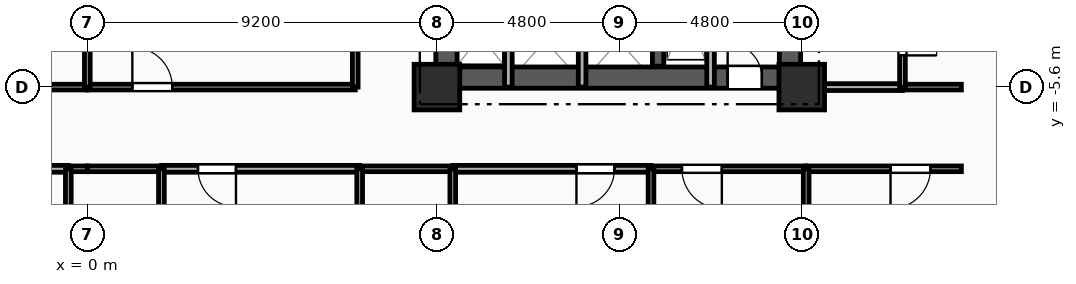
"""IFC4 building model, lengths in metres.
Left out: names, types, materials, properties, quantities, classifications, styles, units other than length and angle.
Written with IfcOpenShell. Run it as: python <this file> out.ifc"""

import sys

from ifc_helpers import new_model, si_unit, direction, frame, frame_2d, origin, origin_2d, place, context, subcontext, project, spatial, rectangle, extrude, element, fill, save


model = new_model("IFC4")
c1 = context("Model", 3, precision=1e-05, world=origin(), true_north=direction((0.0, 1.0)))
c2 = subcontext(c1, "Body", "Model", "MODEL_VIEW")
j1 = project(units=[si_unit("LENGTHUNIT", "METRE"), si_unit("PLANEANGLEUNIT", "RADIAN")], contexts=[c1])
p1 = place(None, origin())
s1 = spatial("IfcSite", under=j1, at=p1, CompositionType="ELEMENT")
p2 = place(p1, origin())
s2 = spatial("IfcBuilding", under=s1, at=p2, CompositionType="ELEMENT")
p3 = place(p2, frame((0.0, 0.0, 30.35)))
s3 = spatial("IfcBuildingStorey", under=s2, at=p3, CompositionType="ELEMENT", Elevation=30.35)
for number, where, z_axis, x_axis in (
    (1, (9.2, -5.6, 0.0), (0.0, 0.0, 1.0), (1.0, 0.0, 0.0)),
    (2, (18.8, -5.6, 0.0), (0.0, 0.0, 1.0), (1.0, 0.0, 0.0)),
):
    element("IfcColumn", number, at=place(p3, frame(where, z_axis=z_axis, x_axis=x_axis)), inside=s3, PredefinedType="COLUMN", context=c2, shape_type="SweptSolid", body=[
        extrude(rectangle(XDim=1.2, YDim=1.2, at=origin_2d()), origin(), (0.0, 0.0, 1.0), 3.35),
    ])
p4 = place(p3, frame((9.2, -5.35, 0.0), z_axis=(0.0, 0.0, 1.0), x_axis=(1.0, 0.0, 0.0)))
e3 = element("IfcWall", 3, at=p4, inside=s3, PredefinedType="SHEAR", context=c2, shape_type="SweptSolid", body=[
    extrude(rectangle(XDim=9.6, YDim=0.56, at=frame_2d((4.8, 0.0))), origin(), (0.0, 0.0, 1.0), 3.035),
])
p5 = place(p4, frame((7.65, 0.0, 0.0)))
e4 = element("IfcOpeningElement", 4, at=p5, cuts=e3, PredefinedType="OPENING", context=c2, shape_type="SweptSolid", body=[
    extrude(rectangle(XDim=0.9, YDim=2.1, at=frame_2d((0.45, 1.05))), frame((0.0, 0.29, 0.0), z_axis=(0.0, -1.0, 0.0), x_axis=(1.0, 0.0, 0.0)), (0.0, 0.0, 1.0), 0.58),
])
p6 = place(p3, frame((9.45, -5.05, 0.0), z_axis=(0.0, 0.0, 1.0), x_axis=(0.0, 1.0, 0.0)))
e5 = element("IfcWall", 5, at=p6, inside=s3, PredefinedType="SHEAR", context=c2, shape_type="SweptSolid", body=[
    extrude(rectangle(XDim=10.1, YDim=0.56, at=frame_2d((5.05, 0.0))), origin(), (0.0, 0.0, 1.0), 3.035),
])
p7 = place(p6, frame((7.15, 0.0, 0.0)))
e6 = element("IfcOpeningElement", 6, at=p7, cuts=e5, PredefinedType="OPENING", context=c2, shape_type="SweptSolid", body=[
    extrude(rectangle(XDim=0.9, YDim=2.1, at=frame_2d((0.45, 1.05))), frame((0.0, 0.29, 0.0), z_axis=(0.0, -1.0, 0.0), x_axis=(1.0, 0.0, 0.0)), (0.0, 0.0, 1.0), 0.58),
])
p8 = place(p6, frame((2.4, 0.0, 0.0)))
e7 = element("IfcOpeningElement", 7, at=p8, cuts=e5, PredefinedType="OPENING", context=c2, shape_type="SweptSolid", body=[
    extrude(rectangle(XDim=1.2, YDim=2.15, at=frame_2d((0.6, 1.075))), frame((0.0, 0.29, 0.0), z_axis=(0.0, -1.0, 0.0), x_axis=(1.0, 0.0, 0.0)), (0.0, 0.0, 1.0), 0.58),
])
p9 = place(p3, frame((18.49, -5.05, 0.0), z_axis=(0.0, 0.0, 1.0), x_axis=(0.0, 1.0, 0.0)))
e8 = element("IfcWall", 8, at=p9, inside=s3, PredefinedType="SHEAR", context=c2, shape_type="SweptSolid", body=[
    extrude(rectangle(XDim=10.1, YDim=0.56, at=frame_2d((5.05, 0.0))), origin(), (0.0, 0.0, 1.0), 3.035),
])
p10 = place(p3, frame((15.02, -5.05, 0.0), z_axis=(0.0, 0.0, 1.0), x_axis=(0.0, 1.0, 0.0)))
e9 = element("IfcWall", 9, at=p10, inside=s3, PredefinedType="SHEAR", context=c2, shape_type="SweptSolid", body=[
    extrude(rectangle(XDim=10.1, YDim=0.3, at=frame_2d((5.05, 0.0))), origin(), (0.0, 0.0, 1.0), 3.035),
])
p11 = place(p3, frame((16.4, -2.11, 0.0), z_axis=(0.0, 0.0, 1.0), x_axis=(0.0, -1.0, 0.0)))
e10 = element("IfcWall", 10, at=p11, inside=s3, PredefinedType="PARTITIONING", context=c2, shape_type="SweptSolid", body=[
    extrude(rectangle(XDim=3.49, YDim=0.2, at=frame_2d((1.745, 0.0))), origin(), (0.0, 0.0, 1.0), 3.035),
])
for number, where, z_axis, x_axis in (
    (11, (11.08, -5.6, 0.0), (0.0, 0.0, 1.0), (0.0, 1.0, 0.0)),
    (12, (13.02, -5.6, 0.0), (0.0, 0.0, 1.0), (0.0, 1.0, 0.0)),
):
    element("IfcWall", number, at=place(p3, frame(where, z_axis=z_axis, x_axis=x_axis)), inside=s3, PredefinedType="PARTITIONING", context=c2, shape_type="SweptSolid", body=[
        extrude(rectangle(XDim=2.25, YDim=0.2, at=frame_2d((1.125, 0.0))), origin(), (0.0, 0.0, 1.0), 3.035),
    ])
p12 = place(p3, frame((-0.5, -7.75, 0.0), z_axis=(0.0, 0.0, 1.0), x_axis=(-1.0, 0.0, 0.0)))
e13 = element("IfcWall", 13, at=p12, inside=s3, PredefinedType="PARTITIONING", context=c2, shape_type="SweptSolid", body=[
    extrude(rectangle(XDim=5.217, YDim=0.18, at=frame_2d((2.608, 0.0))), origin(), (0.0, 0.0, 1.0), 3.035),
])
p13 = place(p12, frame((0.962, 0.0, 0.0)))
e14 = element("IfcOpeningElement", 14, at=p13, cuts=e13, PredefinedType="OPENING", context=c2, shape_type="SweptSolid", body=[
    extrude(rectangle(XDim=1.0, YDim=2.15, at=frame_2d((0.5, 1.075))), frame((0.0, 0.1, 0.0), z_axis=(0.0, -1.0, 0.0), x_axis=(1.0, 0.0, 0.0)), (0.0, 0.0, 1.0), 0.2),
])
p14 = place(p3, frame((0.0, -7.75, 0.0), z_axis=(0.0, 0.0, 1.0), x_axis=(-1.0, 0.0, 0.0)))
e15 = element("IfcWall", 15, at=p14, inside=s3, PredefinedType="PLUMBINGWALL", context=c2, shape_type="SweptSolid", body=[
    extrude(rectangle(XDim=0.5, YDim=0.15, at=frame_2d((0.25, 0.0))), origin(), (0.0, 0.0, 1.0), 3.035),
])
p15 = place(p3, frame((-7.05, -5.6, 0.0), z_axis=(0.0, 0.0, 1.0), x_axis=(1.0, 0.0, 0.0)))
e16 = element("IfcWall", 16, at=p15, inside=s3, PredefinedType="PARTITIONING", context=c2, shape_type="SweptSolid", body=[
    extrude(rectangle(XDim=7.05, YDim=0.15, at=frame_2d((3.525, 0.0))), origin(), (0.0, 0.0, 1.0), 2.52),
])
p16 = place(p3, frame((18.8, -5.6, 0.0), z_axis=(0.0, 0.0, 1.0), x_axis=(1.0, 0.0, 0.0)))
e17 = element("IfcWall", 17, at=p16, inside=s3, PredefinedType="PARTITIONING", context=c2, shape_type="SweptSolid", body=[
    extrude(rectangle(XDim=2.65, YDim=0.18, at=frame_2d((1.325, 0.0))), origin(), (0.0, 0.0, 1.0), 3.035),
])
p17 = place(p3, frame((21.45, -5.6, 0.0), z_axis=(0.0, 0.0, 1.0), x_axis=(1.0, 0.0, 0.0)))
e18 = element("IfcWall", 18, at=p17, inside=s3, PredefinedType="PLUMBINGWALL", context=c2, shape_type="SweptSolid", body=[
    extrude(rectangle(XDim=1.55, YDim=0.15, at=frame_2d((0.775, 0.0))), origin(), (0.0, 0.0, 1.0), 3.035),
])
p18 = place(p3, frame((7.167, -7.75, 0.0), z_axis=(0.0, 0.0, 1.0), x_axis=(-1.0, 0.0, 0.0)))
e19 = element("IfcWall", 19, at=p18, inside=s3, PredefinedType="PARTITIONING", context=c2, shape_type="SweptSolid", body=[
    extrude(rectangle(XDim=5.217, YDim=0.18, at=frame_2d((2.608, 0.0))), origin(), (0.0, 0.0, 1.0), 3.035),
])
p19 = place(p18, frame((3.255, 0.0, 0.0)))
e20 = element("IfcOpeningElement", 20, at=p19, cuts=e19, PredefinedType="OPENING", context=c2, shape_type="SweptSolid", body=[
    extrude(rectangle(XDim=1.0, YDim=2.15, at=frame_2d((0.5, 1.075))), frame((0.0, 0.1, 0.0), z_axis=(0.0, -1.0, 0.0), x_axis=(1.0, 0.0, 0.0)), (0.0, 0.0, 1.0), 0.2),
])
p20 = place(p3, frame((1.95, -7.75, 0.0), z_axis=(0.0, 0.0, 1.0), x_axis=(-1.0, 0.0, 0.0)))
e21 = element("IfcWall", 21, at=p20, inside=s3, PredefinedType="PLUMBINGWALL", context=c2, shape_type="SweptSolid", body=[
    extrude(rectangle(XDim=1.95, YDim=0.15, at=frame_2d((0.975, 0.0))), origin(), (0.0, 0.0, 1.0), 3.035),
])
p21 = place(p3, frame((14.833, -7.75, 0.0), z_axis=(0.0, 0.0, 1.0), x_axis=(-1.0, 0.0, 0.0)))
e22 = element("IfcWall", 22, at=p21, inside=s3, PredefinedType="PARTITIONING", context=c2, shape_type="SweptSolid", body=[
    extrude(rectangle(XDim=5.216, YDim=0.18, at=frame_2d((2.608, 0.0))), origin(), (0.0, 0.0, 1.0), 3.035),
])
p22 = place(p21, frame((0.962, 0.0, 0.0)))
e23 = element("IfcOpeningElement", 23, at=p22, cuts=e22, PredefinedType="OPENING", context=c2, shape_type="SweptSolid", body=[
    extrude(rectangle(XDim=1.0, YDim=2.15, at=frame_2d((0.5, 1.075))), frame((0.0, 0.1, 0.0), z_axis=(0.0, -1.0, 0.0), x_axis=(1.0, 0.0, 0.0)), (0.0, 0.0, 1.0), 0.2),
])
p23 = place(p3, frame((9.617, -7.75, 0.0), z_axis=(0.0, 0.0, 1.0), x_axis=(-1.0, 0.0, 0.0)))
e24 = element("IfcWall", 24, at=p23, inside=s3, PredefinedType="PLUMBINGWALL", context=c2, shape_type="SweptSolid", body=[
    extrude(rectangle(XDim=2.45, YDim=0.15, at=frame_2d((1.225, 0.0))), origin(), (0.0, 0.0, 1.0), 3.035),
])
p24 = place(p3, frame((18.917, -7.75, 0.0), z_axis=(0.0, 0.0, 1.0), x_axis=(-1.0, 0.0, 0.0)))
e25 = element("IfcWall", 25, at=p24, inside=s3, PredefinedType="PARTITIONING", context=c2, shape_type="SweptSolid", body=[
    extrude(rectangle(XDim=4.083, YDim=0.15, at=frame_2d((2.042, 0.0))), origin(), (0.0, 0.0, 1.0), 3.035),
])
p25 = place(p24, frame((2.219, 0.0, 0.0)))
e26 = element("IfcOpeningElement", 26, at=p25, cuts=e25, PredefinedType="OPENING", context=c2, shape_type="SweptSolid", body=[
    extrude(rectangle(XDim=1.05, YDim=2.15, at=frame_2d((0.525, 1.075))), frame((0.0, 0.085, 0.0), z_axis=(0.0, -1.0, 0.0), x_axis=(1.0, 0.0, 0.0)), (0.0, 0.0, 1.0), 0.17),
])
p26 = place(p3, frame((23.0, -7.75, 0.0), z_axis=(0.0, 0.0, 1.0), x_axis=(-1.0, 0.0, 0.0)))
e27 = element("IfcWall", 27, at=p26, inside=s3, PredefinedType="PARTITIONING", context=c2, shape_type="SweptSolid", body=[
    extrude(rectangle(XDim=4.083, YDim=0.15, at=frame_2d((2.042, 0.0))), origin(), (0.0, 0.0, 1.0), 3.035),
])
p27 = place(p26, frame((0.814, 0.0, 0.0)))
e28 = element("IfcOpeningElement", 28, at=p27, cuts=e27, PredefinedType="OPENING", context=c2, shape_type="SweptSolid", body=[
    extrude(rectangle(XDim=1.05, YDim=2.15, at=frame_2d((0.525, 1.075))), frame((0.0, 0.085, 0.0), z_axis=(0.0, -1.0, 0.0), x_axis=(1.0, 0.0, 0.0)), (0.0, 0.0, 1.0), 0.17),
])
p28 = place(p3, frame((0.0, -5.6, 0.0), z_axis=(0.0, 0.0, 1.0), x_axis=(1.0, 0.0, 0.0)))
e29 = element("IfcWall", 29, at=p28, inside=s3, PredefinedType="PARTITIONING", context=c2, shape_type="SweptSolid", body=[
    extrude(rectangle(XDim=7.05, YDim=0.15, at=frame_2d((3.525, 0.0))), origin(), (0.0, 0.0, 1.0), 2.52),
])
p29 = place(p28, frame((1.185, 0.0, 0.0)))
e30 = element("IfcOpeningElement", 30, at=p29, cuts=e29, PredefinedType="OPENING", context=c2, shape_type="SweptSolid", body=[
    extrude(rectangle(XDim=1.05, YDim=2.15, at=frame_2d((0.525, 1.075))), frame((0.0, 0.085, 0.0), z_axis=(0.0, -1.0, 0.0), x_axis=(1.0, 0.0, 0.0)), (0.0, 0.0, 1.0), 0.17),
])
p30 = place(p3, frame((7.05, -5.6, 0.0), z_axis=(0.0, 0.0, 1.0), x_axis=(0.0, 1.0, 0.0)))
e31 = element("IfcWall", 31, at=p30, inside=s3, PredefinedType="PARTITIONING", context=c2, shape_type="SweptSolid", body=[
    extrude(rectangle(XDim=7.05, YDim=0.15, at=frame_2d((3.525, 0.0))), origin(), (0.0, 0.0, 1.0), 3.035),
])
p31 = place(p3, frame((21.45, -3.25, 0.0), z_axis=(0.0, 0.0, 1.0), x_axis=(0.0, -1.0, 0.0)))
e32 = element("IfcWall", 32, at=p31, inside=s3, PredefinedType="PLUMBINGWALL", context=c2, shape_type="SweptSolid", body=[
    extrude(rectangle(XDim=2.35, YDim=0.15, at=frame_2d((1.175, 0.0))), origin(), (0.0, 0.0, 1.0), 3.035),
])
p32 = place(p31, frame((0.616, 0.0, 0.0)))
e33 = element("IfcOpeningElement", 33, at=p32, cuts=e32, PredefinedType="OPENING", context=c2, shape_type="SweptSolid", body=[
    extrude(rectangle(XDim=0.9, YDim=2.1, at=frame_2d((0.45, 1.05))), frame((0.0, 0.085, 0.0), z_axis=(0.0, -1.0, 0.0), x_axis=(1.0, 0.0, 0.0)), (0.0, 0.0, 1.0), 0.17),
])
for number, where, z_axis, x_axis in (
    (34, (-0.5, -7.75, 0.0), (0.0, 0.0, 1.0), (0.0, -1.0, 0.0)),
    (35, (1.95, -9.9, 0.0), (0.0, 0.0, 1.0), (0.0, 1.0, 0.0)),
    (36, (7.167, -7.75, 0.0), (0.0, 0.0, 1.0), (0.0, -1.0, 0.0)),
    (37, (9.617, -9.9, 0.0), (0.0, 0.0, 1.0), (0.0, 1.0, 0.0)),
):
    element("IfcWall", number, at=place(p3, frame(where, z_axis=z_axis, x_axis=x_axis)), inside=s3, PredefinedType="PLUMBINGWALL", context=c2, shape_type="SweptSolid", body=[
        extrude(rectangle(XDim=2.15, YDim=0.15, at=frame_2d((1.075, 0.0))), origin(), (0.0, 0.0, 1.0), 3.035),
    ])
p33 = place(p3, frame((14.833, -7.75, 0.0), z_axis=(0.0, 0.0, 1.0), x_axis=(0.0, -1.0, 0.0)))
e38 = element("IfcWall", 38, at=p33, inside=s3, PredefinedType="PARTITIONING", context=c2, shape_type="SweptSolid", body=[
    extrude(rectangle(XDim=11.65, YDim=0.15, at=frame_2d((5.825, 0.0))), origin(), (0.0, 0.0, 1.0), 3.035),
])
p34 = place(p3, frame((18.917, -7.75, 0.0), z_axis=(0.0, 0.0, 1.0), x_axis=(0.0, -1.0, 0.0)))
e39 = element("IfcWall", 39, at=p34, inside=s3, PredefinedType="PARTITIONING", context=c2, shape_type="SweptSolid", body=[
    extrude(rectangle(XDim=11.65, YDim=0.15, at=frame_2d((5.825, 0.0))), origin(), (0.0, 0.0, 1.0), 2.52),
])
p35 = place(p3, frame((0.0, 1.45, 0.0), z_axis=(0.0, 0.0, 1.0), x_axis=(0.0, -1.0, 0.0)))
e40 = element("IfcWall", 40, at=p35, inside=s3, PredefinedType="PARTITIONING", context=c2, shape_type="SweptSolid", body=[
    extrude(rectangle(XDim=7.05, YDim=0.15, at=frame_2d((3.525, 0.0))), origin(), (0.0, 0.0, 1.0), 3.035),
])
p36 = place(p5, origin())
e41 = element("IfcDoor", 41, at=p36, inside=s3, OperationType="SINGLE_SWING_LEFT", PredefinedType="DOOR", context=c2, shape_type="SweptSolid", body=[
    extrude(rectangle(XDim=0.9, YDim=2.1, at=frame_2d((0.45, 1.05))), frame((0.0, 0.025, 0.0), z_axis=(0.0, -1.0, 0.0), x_axis=(1.0, 0.0, 0.0)), (0.0, 0.0, 1.0), 0.05),
])
fill(e4, e41)
p37 = place(p19, origin())
e42 = element("IfcDoor", 42, at=p37, inside=s3, OperationType="SINGLE_SWING_LEFT", PredefinedType="DOOR", context=c2, shape_type="SweptSolid", body=[
    extrude(rectangle(XDim=1.0, YDim=2.15, at=frame_2d((0.5, 1.075))), frame((0.0, 0.025, 0.0), z_axis=(0.0, -1.0, 0.0), x_axis=(1.0, 0.0, 0.0)), (0.0, 0.0, 1.0), 0.05),
])
fill(e20, e42)
p38 = place(p22, origin())
e43 = element("IfcDoor", 43, at=p38, inside=s3, OperationType="SINGLE_SWING_RIGHT", PredefinedType="DOOR", context=c2, shape_type="SweptSolid", body=[
    extrude(rectangle(XDim=1.0, YDim=2.15, at=frame_2d((0.5, 1.075))), frame((0.0, 0.025, 0.0), z_axis=(0.0, -1.0, 0.0), x_axis=(1.0, 0.0, 0.0)), (0.0, 0.0, 1.0), 0.05),
])
fill(e23, e43)
p39 = place(p25, origin())
e44 = element("IfcDoor", 44, at=p39, inside=s3, OperationType="SINGLE_SWING_LEFT", PredefinedType="DOOR", context=c2, shape_type="SweptSolid", body=[
    extrude(rectangle(XDim=1.05, YDim=2.15, at=frame_2d((0.525, 1.075))), frame((0.0, 0.025, 0.0), z_axis=(0.0, -1.0, 0.0), x_axis=(1.0, 0.0, 0.0)), (0.0, 0.0, 1.0), 0.05),
])
fill(e26, e44)
p40 = place(p27, origin())
e45 = element("IfcDoor", 45, at=p40, inside=s3, OperationType="SINGLE_SWING_RIGHT", PredefinedType="DOOR", context=c2, shape_type="SweptSolid", body=[
    extrude(rectangle(XDim=1.05, YDim=2.15, at=frame_2d((0.525, 1.075))), frame((0.0, 0.025, 0.0), z_axis=(0.0, -1.0, 0.0), x_axis=(1.0, 0.0, 0.0)), (0.0, 0.0, 1.0), 0.05),
])
fill(e28, e45)
p41 = place(p29, origin())
e46 = element("IfcDoor", 46, at=p41, inside=s3, OperationType="SINGLE_SWING_LEFT", PredefinedType="DOOR", context=c2, shape_type="SweptSolid", body=[
    extrude(rectangle(XDim=1.05, YDim=2.15, at=frame_2d((0.525, 1.075))), frame((0.0, 0.025, 0.0), z_axis=(0.0, -1.0, 0.0), x_axis=(1.0, 0.0, 0.0)), (0.0, 0.0, 1.0), 0.05),
])
fill(e30, e46)
p42 = place(p32, origin())
e47 = element("IfcDoor", 47, at=p42, inside=s3, OperationType="SINGLE_SWING_RIGHT", PredefinedType="DOOR", context=c2, shape_type="SweptSolid", body=[
    extrude(rectangle(XDim=0.9, YDim=2.1, at=frame_2d((0.45, 1.05))), frame((0.0, 0.025, 0.0), z_axis=(0.0, -1.0, 0.0), x_axis=(1.0, 0.0, 0.0)), (0.0, 0.0, 1.0), 0.05),
])
fill(e33, e47)
save(model, sys.argv[1])
